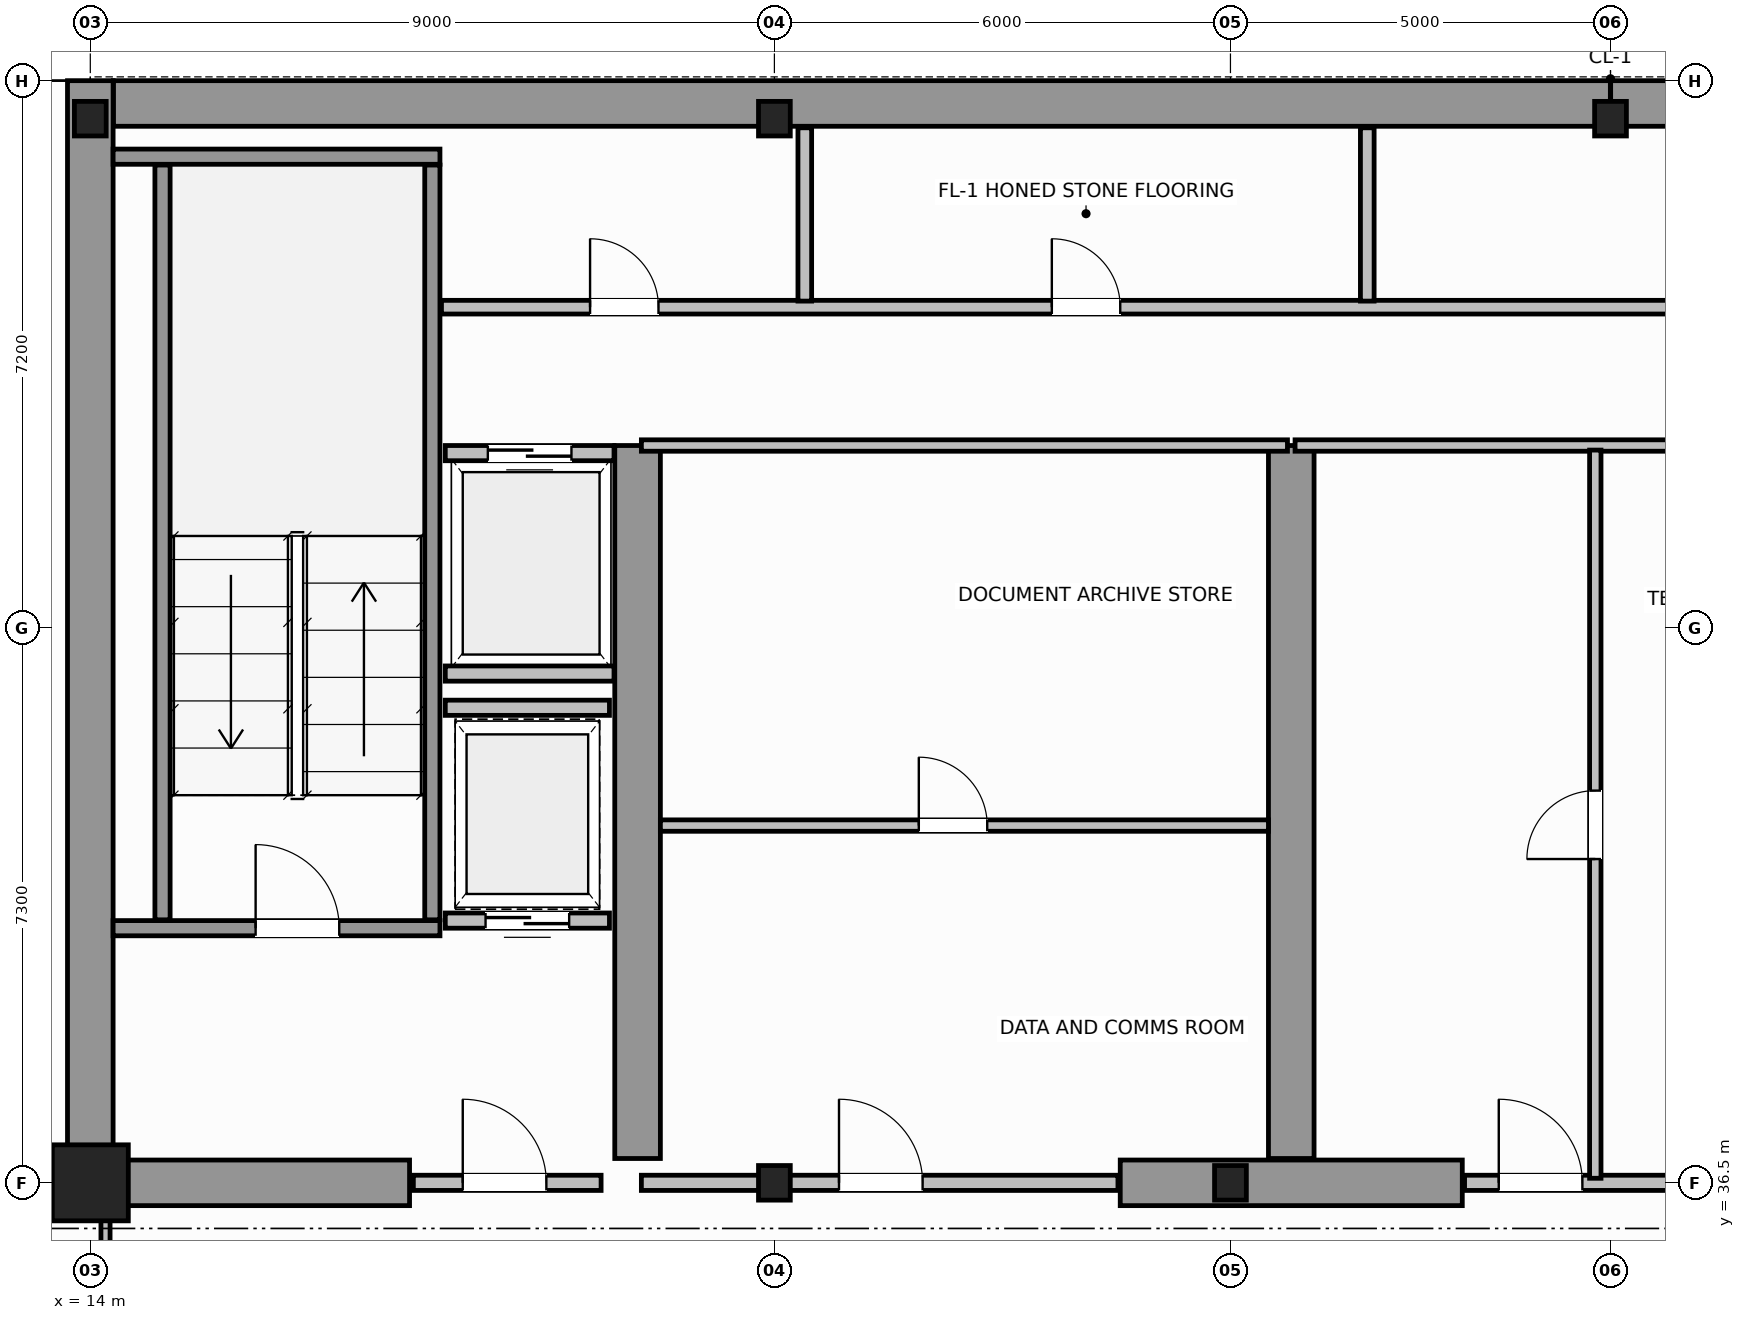
"""IFC4 building model, lengths in metres.
Left out: names, types, materials, properties, quantities, classifications, styles, units other than length and angle.
Written with IfcOpenShell. Run it as: python <this file> out.ifc"""

import sys

from ifc_helpers import new_model, si_unit, direction, frame, frame_2d, origin, origin_2d, place, context, subcontext, project, spatial, rectangle, i_section, extrude, source, transform, mapped, element, fill, save


model = new_model("IFC4")
c1 = context("Model", 3, precision=1e-05, world=origin(), true_north=direction((0.0, 1.0)))
c2 = subcontext(c1, "Body", "Model", "MODEL_VIEW")
j1 = project(units=[si_unit("LENGTHUNIT", "METRE"), si_unit("PLANEANGLEUNIT", "RADIAN")], contexts=[c1])
p1 = place(None, origin())
s1 = spatial("IfcSite", under=j1, at=p1, CompositionType="ELEMENT")
p2 = place(p1, origin())
s2 = spatial("IfcBuilding", under=s1, at=p2, CompositionType="ELEMENT")
p3 = place(p2, frame((0.0, 0.0, 223.2)))
s3 = spatial("IfcBuildingStorey", under=s2, at=p3, CompositionType="ELEMENT", Elevation=223.2)
m1 = source(origin(), c2, "Body", "SweptSolid", [
    extrude(rectangle(XDim=1.0, YDim=1.0, at=origin_2d()), origin(), (0.0, 0.0, 1.0), 3.8),
])
p4 = place(p3, frame((14.0, 36.5, 0.0), z_axis=(0.0, 0.0, 1.0), x_axis=(1.0, 0.0, 0.0)))
e1 = element("IfcColumn", 1, at=p4, inside=s3, PredefinedType="COLUMN", context=c2, shape_type="MappedRepresentation", body=[
    mapped(m1, transform((0.0, 0.0, 0.0), scale=1.0)),
])
m2 = source(origin(), c2, "Body", "SweptSolid", [
    extrude(i_section(OverallWidth=0.418, OverallDepth=0.455, WebThickness=0.042, FlangeThickness=0.058, FilletRadius=0.015, at=origin_2d()), origin(), (0.0, 0.0, 1.0), 3.8),
])
for number, where, z_axis, x_axis in (
    (2, (23.0, 36.5, 0.0), (0.0, 0.0, 1.0), (1.0, 0.0, 0.0)),
    (3, (29.0, 36.5, 0.0), (0.0, 0.0, 1.0), (1.0, 0.0, 0.0)),
    (4, (14.0, 50.5, 0.0), (0.0, 0.0, 1.0), (1.0, 0.0, 0.0)),
    (5, (23.0, 50.5, 0.0), (0.0, 0.0, 1.0), (1.0, 0.0, 0.0)),
    (6, (34.0, 50.5, 0.0), (0.0, 0.0, 1.0), (1.0, 0.0, 0.0)),
):
    element("IfcColumn", number, at=place(p3, frame(where, z_axis=z_axis, x_axis=x_axis)), inside=s3, PredefinedType="COLUMN", context=c2, shape_type="MappedRepresentation", body=[
        mapped(m2, transform((0.0, 0.0, 0.0), scale=1.0)),
    ])
for number, where, z_axis, x_axis in (
    (7, (14.304, 50.7, 0.0), (0.0, 0.0, 1.0), (1.0, 0.0, 0.0)),
    (8, (34.002, 50.7, 0.0), (0.0, 0.0, 1.0), (1.0, 0.0, 0.0)),
):
    element("IfcWall", number, at=place(p3, frame(where, z_axis=z_axis, x_axis=x_axis)), inside=s3, PredefinedType="SHEAR", context=c2, shape_type="SweptSolid", body=[
        extrude(rectangle(XDim=19.694, YDim=0.6, at=frame_2d((9.847, 0.0))), origin(), (0.0, 0.0, 1.0), 3.8),
    ])
p5 = place(p3, frame((14.0, 36.5, 0.0), z_axis=(0.0, 0.0, 1.0), x_axis=(0.0, 1.0, 0.0)))
e9 = element("IfcWall", 9, at=p5, inside=s3, PredefinedType="SHEAR", context=c2, shape_type="SweptSolid", body=[
    extrude(rectangle(XDim=14.5, YDim=0.6, at=frame_2d((7.25, 0.0))), origin(), (0.0, 0.0, 1.0), 3.8),
])
p6 = place(p3, frame((14.32, 36.5, 0.0), z_axis=(0.0, 0.0, 1.0), x_axis=(1.0, 0.0, 0.0)))
e10 = element("IfcWall", 10, at=p6, inside=s3, PredefinedType="SHEAR", context=c2, shape_type="SweptSolid", body=[
    extrude(rectangle(XDim=3.88, YDim=0.6, at=frame_2d((1.94, 0.0))), origin(), (0.0, 0.0, 1.0), 2.58),
])
p7 = place(p3, frame((27.55, 36.5, 0.0), z_axis=(0.0, 0.0, 1.0), x_axis=(1.0, 0.0, 0.0)))
e11 = element("IfcWall", 11, at=p7, inside=s3, PredefinedType="SHEAR", context=c2, shape_type="SweptSolid", body=[
    extrude(rectangle(XDim=4.5, YDim=0.6, at=frame_2d((2.25, 0.0))), origin(), (0.0, 0.0, 1.0), 3.8),
])
for number, where, z_axis, x_axis in (
    (12, (21.2, 36.82, 0.0), (0.0, 0.0, 1.0), (0.0, 1.0, 0.0)),
    (13, (29.8, 36.82, 0.0), (0.0, 0.0, 1.0), (0.0, 1.0, 0.0)),
):
    element("IfcWall", number, at=place(p3, frame(where, z_axis=z_axis, x_axis=x_axis)), inside=s3, PredefinedType="SHEAR", context=c2, shape_type="SweptSolid", body=[
        extrude(rectangle(XDim=9.38, YDim=0.6, at=frame_2d((4.69, 0.0))), origin(), (0.0, 0.0, 1.0), 3.8),
    ])
p8 = place(p3, frame((14.3, 39.85, 0.0), z_axis=(0.0, 0.0, 1.0), x_axis=(1.0, 0.0, 0.0)))
e14 = element("IfcWall", 14, at=p8, inside=s3, PredefinedType="SOLIDWALL", context=c2, shape_type="SweptSolid", body=[
    extrude(rectangle(XDim=4.3, YDim=0.2, at=frame_2d((2.15, 0.0))), origin(), (0.0, 0.0, 1.0), 3.8),
])
p9 = place(p8, frame((1.875, 0.0, 0.0)))
e15 = element("IfcOpeningElement", 15, at=p9, cuts=e14, PredefinedType="OPENING", context=c2, shape_type="SweptSolid", body=[
    extrude(rectangle(XDim=1.1, YDim=2.15, at=frame_2d((0.55, 1.075))), frame((0.0, 0.11, 0.0), z_axis=(0.0, -1.0, 0.0), x_axis=(1.0, 0.0, 0.0)), (0.0, 0.0, 1.0), 0.22),
])
p10 = place(p3, frame((14.3, 50.0, 0.0), z_axis=(0.0, 0.0, 1.0), x_axis=(1.0, 0.0, 0.0)))
e16 = element("IfcWall", 16, at=p10, inside=s3, PredefinedType="SOLIDWALL", context=c2, shape_type="SweptSolid", body=[
    extrude(rectangle(XDim=4.3, YDim=0.2, at=frame_2d((2.15, 0.0))), origin(), (0.0, 0.0, 1.0), 3.8),
])
for number, where, z_axis, x_axis in (
    (17, (14.95, 39.96, 0.0), (0.0, 0.0, 1.0), (0.0, 1.0, 0.0)),
    (18, (18.5, 39.96, 0.0), (0.0, 0.0, 1.0), (0.0, 1.0, 0.0)),
):
    element("IfcWall", number, at=place(p3, frame(where, z_axis=z_axis, x_axis=x_axis)), inside=s3, PredefinedType="SOLIDWALL", context=c2, shape_type="SweptSolid", body=[
        extrude(rectangle(XDim=9.93, YDim=0.2, at=frame_2d((4.965, 0.0))), origin(), (0.0, 0.0, 1.0), 3.8),
    ])
p11 = place(p3, frame((18.25, 36.5, 0.0), z_axis=(0.0, 0.0, 1.0), x_axis=(1.0, 0.0, 0.0)))
e19 = element("IfcWall", 19, at=p11, inside=s3, PredefinedType="SOLIDWALL", context=c2, shape_type="SweptSolid", body=[
    extrude(rectangle(XDim=2.47, YDim=0.2, at=frame_2d((1.235, 0.0))), origin(), (0.0, 0.0, 1.0), 2.57),
])
p12 = place(p11, frame((0.65, 0.0, 0.0)))
e20 = element("IfcOpeningElement", 20, at=p12, cuts=e19, PredefinedType="OPENING", context=c2, shape_type="SweptSolid", body=[
    extrude(rectangle(XDim=1.1, YDim=2.15, at=frame_2d((0.55, 1.075))), frame((0.0, 0.11, 0.0), z_axis=(0.0, -1.0, 0.0), x_axis=(1.0, 0.0, 0.0)), (0.0, 0.0, 1.0), 0.22),
])
p13 = place(p3, frame((18.67, 46.1, 0.0), z_axis=(0.0, 0.0, 1.0), x_axis=(1.0, 0.0, 0.0)))
e21 = element("IfcWall", 21, at=p13, inside=s3, PredefinedType="SOLIDWALL", context=c2, shape_type="SweptSolid", body=[
    extrude(rectangle(XDim=2.22, YDim=0.2, at=frame_2d((1.11, 0.0))), origin(), (0.0, 0.0, 1.0), 3.58),
])
p14 = place(p13, frame((0.56, 0.0, 0.0)))
e22 = element("IfcOpeningElement", 22, at=p14, cuts=e21, PredefinedType="OPENING", context=c2, shape_type="SweptSolid", body=[
    extrude(rectangle(XDim=1.1, YDim=2.15, at=frame_2d((0.55, 1.075))), frame((0.0, 0.11, 0.0), z_axis=(0.0, -1.0, 0.0), x_axis=(1.0, 0.0, 0.0)), (0.0, 0.0, 1.0), 0.22),
])
p15 = place(p3, frame((18.67, 43.2, 0.0), z_axis=(0.0, 0.0, 1.0), x_axis=(1.0, 0.0, 0.0)))
e23 = element("IfcWall", 23, at=p15, inside=s3, PredefinedType="SOLIDWALL", context=c2, shape_type="SweptSolid", body=[
    extrude(rectangle(XDim=2.22, YDim=0.2, at=frame_2d((1.11, 0.0))), origin(), (0.0, 0.0, 1.0), 3.58),
])
p16 = place(p3, frame((18.67, 39.95, 0.0), z_axis=(0.0, 0.0, 1.0), x_axis=(1.0, 0.0, 0.0)))
e24 = element("IfcWall", 24, at=p16, inside=s3, PredefinedType="SOLIDWALL", context=c2, shape_type="SweptSolid", body=[
    extrude(rectangle(XDim=2.16, YDim=0.2, at=frame_2d((1.08, 0.0))), origin(), (0.0, 0.0, 1.0), 3.58),
])
p17 = place(p16, frame((0.53, 0.0, 0.0)))
e25 = element("IfcOpeningElement", 25, at=p17, cuts=e24, PredefinedType="OPENING", context=c2, shape_type="SweptSolid", body=[
    extrude(rectangle(XDim=1.1, YDim=2.15, at=frame_2d((0.55, 1.075))), frame((0.0, 0.11, 0.0), z_axis=(0.0, -1.0, 0.0), x_axis=(1.0, 0.0, 0.0)), (0.0, 0.0, 1.0), 0.22),
])
p18 = place(p3, frame((18.67, 42.75, 0.0), z_axis=(0.0, 0.0, 1.0), x_axis=(1.0, 0.0, 0.0)))
e26 = element("IfcWall", 26, at=p18, inside=s3, PredefinedType="SOLIDWALL", context=c2, shape_type="SweptSolid", body=[
    extrude(rectangle(XDim=2.16, YDim=0.2, at=frame_2d((1.08, 0.0))), origin(), (0.0, 0.0, 1.0), 3.58),
])
p19 = place(p3, frame((21.25, 36.5, 0.0), z_axis=(0.0, 0.0, 1.0), x_axis=(1.0, 0.0, 0.0)))
e27 = element("IfcWall", 27, at=p19, inside=s3, PredefinedType="SOLIDWALL", context=c2, shape_type="SweptSolid", body=[
    extrude(rectangle(XDim=6.27, YDim=0.2, at=frame_2d((3.135, 0.0))), origin(), (0.0, 0.0, 1.0), 2.57),
])
p20 = place(p19, frame((2.6, 0.0, 0.0)))
e28 = element("IfcOpeningElement", 28, at=p20, cuts=e27, PredefinedType="OPENING", context=c2, shape_type="SweptSolid", body=[
    extrude(rectangle(XDim=1.1, YDim=2.15, at=frame_2d((0.55, 1.075))), frame((0.0, 0.11, 0.0), z_axis=(0.0, -1.0, 0.0), x_axis=(1.0, 0.0, 0.0)), (0.0, 0.0, 1.0), 0.22),
])
p21 = place(p3, frame((21.25, 46.2, 0.0), z_axis=(0.0, 0.0, 1.0), x_axis=(1.0, 0.0, 0.0)))
e29 = element("IfcWall", 29, at=p21, inside=s3, PredefinedType="PARTITIONING", context=c2, shape_type="SweptSolid", body=[
    extrude(rectangle(XDim=8.5, YDim=0.15, at=frame_2d((4.25, 0.0))), origin(), (0.0, 0.0, 1.0), 3.58),
])
p22 = place(p3, frame((21.5, 41.2, 0.0), z_axis=(0.0, 0.0, 1.0), x_axis=(1.0, 0.0, 0.0)))
e30 = element("IfcWall", 30, at=p22, inside=s3, PredefinedType="PARTITIONING", context=c2, shape_type="SweptSolid", body=[
    extrude(rectangle(XDim=8.0, YDim=0.15, at=frame_2d((4.0, 0.0))), origin(), (0.0, 0.0, 1.0), 3.58),
])
p23 = place(p22, frame((3.4, 0.0, 0.0)))
e31 = element("IfcOpeningElement", 31, at=p23, cuts=e30, PredefinedType="OPENING", context=c2, shape_type="SweptSolid", body=[
    extrude(rectangle(XDim=0.9, YDim=2.1, at=frame_2d((0.45, 1.05))), frame((0.0, 0.085, 0.0), z_axis=(0.0, -1.0, 0.0), x_axis=(1.0, 0.0, 0.0)), (0.0, 0.0, 1.0), 0.17),
])
p24 = place(p3, frame((32.08, 36.5, 0.0), z_axis=(0.0, 0.0, 1.0), x_axis=(1.0, 0.0, 0.0)))
e32 = element("IfcWall", 32, at=p24, inside=s3, PredefinedType="SOLIDWALL", context=c2, shape_type="SweptSolid", body=[
    extrude(rectangle(XDim=4.04, YDim=0.2, at=frame_2d((2.02, 0.0))), origin(), (0.0, 0.0, 1.0), 2.97),
])
p25 = place(p24, frame((0.45, 0.0, 0.0)))
e33 = element("IfcOpeningElement", 33, at=p25, cuts=e32, PredefinedType="OPENING", context=c2, shape_type="SweptSolid", body=[
    extrude(rectangle(XDim=1.1, YDim=2.15, at=frame_2d((0.55, 1.075))), frame((0.0, 0.11, 0.0), z_axis=(0.0, -1.0, 0.0), x_axis=(1.0, 0.0, 0.0)), (0.0, 0.0, 1.0), 0.22),
])
p26 = place(p3, frame((29.85, 46.2, 0.0), z_axis=(0.0, 0.0, 1.0), x_axis=(1.0, 0.0, 0.0)))
e34 = element("IfcWall", 34, at=p26, inside=s3, PredefinedType="PARTITIONING", context=c2, shape_type="SweptSolid", body=[
    extrude(rectangle(XDim=8.5, YDim=0.15, at=frame_2d((4.25, 0.0))), origin(), (0.0, 0.0, 1.0), 3.58),
])
p27 = place(p3, frame((33.8, 36.56, 0.0), z_axis=(0.0, 0.0, 1.0), x_axis=(0.0, 1.0, 0.0)))
e35 = element("IfcWall", 35, at=p27, inside=s3, PredefinedType="PARTITIONING", context=c2, shape_type="SweptSolid", body=[
    extrude(rectangle(XDim=9.58, YDim=0.15, at=frame_2d((4.79, 0.0))), origin(), (0.0, 0.0, 1.0), 3.58),
])
p28 = place(p27, frame((4.2, 0.0, 0.0)))
e36 = element("IfcOpeningElement", 36, at=p28, cuts=e35, PredefinedType="OPENING", context=c2, shape_type="SweptSolid", body=[
    extrude(rectangle(XDim=0.9, YDim=2.1, at=frame_2d((0.45, 1.05))), frame((0.0, 0.085, 0.0), z_axis=(0.0, -1.0, 0.0), x_axis=(1.0, 0.0, 0.0)), (0.0, 0.0, 1.0), 0.17),
])
p29 = place(p3, frame((18.62, 48.02, 0.0), z_axis=(0.0, 0.0, 1.0), x_axis=(1.0, 0.0, 0.0)))
e37 = element("IfcWall", 37, at=p29, inside=s3, PredefinedType="PLUMBINGWALL", context=c2, shape_type="SweptSolid", body=[
    extrude(rectangle(XDim=30.76, YDim=0.18, at=frame_2d((15.38, 0.0))), origin(), (0.0, 0.0, 1.0), 3.58),
])
p30 = place(p29, frame((1.955, 0.0, 0.0)))
e38 = element("IfcOpeningElement", 38, at=p30, cuts=e37, PredefinedType="OPENING", context=c2, shape_type="SweptSolid", body=[
    extrude(rectangle(XDim=0.9, YDim=2.15, at=frame_2d((0.45, 1.075))), frame((0.0, 0.1, 0.0), z_axis=(0.0, -1.0, 0.0), x_axis=(1.0, 0.0, 0.0)), (0.0, 0.0, 1.0), 0.2),
])
p31 = place(p29, frame((8.03, 0.0, 0.0)))
e39 = element("IfcOpeningElement", 39, at=p31, cuts=e37, PredefinedType="OPENING", context=c2, shape_type="SweptSolid", body=[
    extrude(rectangle(XDim=0.9, YDim=2.15, at=frame_2d((0.45, 1.075))), frame((0.0, 0.1, 0.0), z_axis=(0.0, -1.0, 0.0), x_axis=(1.0, 0.0, 0.0)), (0.0, 0.0, 1.0), 0.2),
])
p32 = place(p29, frame((16.93, 0.0, 0.0)))
e40 = element("IfcOpeningElement", 40, at=p32, cuts=e37, PredefinedType="OPENING", context=c2, shape_type="SweptSolid", body=[
    extrude(rectangle(XDim=0.9, YDim=2.15, at=frame_2d((0.45, 1.075))), frame((0.0, 0.1, 0.0), z_axis=(0.0, -1.0, 0.0), x_axis=(1.0, 0.0, 0.0)), (0.0, 0.0, 1.0), 0.2),
])
p33 = place(p29, frame((26.205, 0.0, 0.0)))
e41 = element("IfcOpeningElement", 41, at=p33, cuts=e37, PredefinedType="OPENING", context=c2, shape_type="SweptSolid", body=[
    extrude(rectangle(XDim=0.9, YDim=2.15, at=frame_2d((0.45, 1.075))), frame((0.0, 0.1, 0.0), z_axis=(0.0, -1.0, 0.0), x_axis=(1.0, 0.0, 0.0)), (0.0, 0.0, 1.0), 0.2),
])
for number, where, z_axis, x_axis in (
    (42, (23.4, 48.1, 0.0), (0.0, 0.0, 1.0), (0.0, 1.0, 0.0)),
    (43, (30.8, 48.1, 0.0), (0.0, 0.0, 1.0), (0.0, 1.0, 0.0)),
):
    element("IfcWall", number, at=place(p3, frame(where, z_axis=z_axis, x_axis=x_axis)), inside=s3, PredefinedType="PLUMBINGWALL", context=c2, shape_type="SweptSolid", body=[
        extrude(rectangle(XDim=2.28, YDim=0.18, at=frame_2d((1.14, 0.0))), origin(), (0.0, 0.0, 1.0), 3.58),
    ])
p34 = place(p3, frame((14.2, 34.0, 0.0), z_axis=(0.0, 0.0, 1.0), x_axis=(0.0, 1.0, 0.0)))
e44 = element("IfcWall", 44, at=p34, inside=s3, PredefinedType="PARTITIONING", context=c2, shape_type="SweptSolid", body=[
    extrude(rectangle(XDim=2.44, YDim=0.12, at=frame_2d((1.22, 0.0))), origin(), (0.0, 0.0, 1.0), 3.58),
])
p35 = place(p34, frame((0.7, 0.0, 0.0)))
e45 = element("IfcOpeningElement", 45, at=p35, cuts=e44, PredefinedType="OPENING", context=c2, shape_type="SweptSolid", body=[
    extrude(rectangle(XDim=0.9, YDim=2.15, at=frame_2d((0.45, 1.075))), frame((0.0, 0.07, 0.0), z_axis=(0.0, -1.0, 0.0), x_axis=(1.0, 0.0, 0.0)), (0.0, 0.0, 1.0), 0.14),
])
m3 = source(origin(), c2, "Body", "SweptSolid", [
    extrude(rectangle(XDim=1.1, YDim=2.15, at=frame_2d((0.55, 1.075))), frame((0.0, 0.025, 0.0), z_axis=(0.0, -1.0, 0.0), x_axis=(1.0, 0.0, 0.0)), (0.0, 0.0, 1.0), 0.05),
])
p36 = place(p9, origin())
e46 = element("IfcDoor", 46, at=p36, inside=s3, OperationType="SINGLE_SWING_LEFT", PredefinedType="DOOR", context=c2, shape_type="MappedRepresentation", body=[
    mapped(m3, transform((0.0, 0.0, 0.0), scale=1.0)),
])
fill(e15, e46)
p37 = place(p12, origin())
e47 = element("IfcDoor", 47, at=p37, inside=s3, OperationType="SINGLE_SWING_RIGHT", PredefinedType="DOOR", context=c2, shape_type="MappedRepresentation", body=[
    mapped(m3, transform((0.0, 0.0, 0.0), scale=1.0)),
])
fill(e20, e47)
p38 = place(p14, origin())
e48 = element("IfcDoor", 48, at=p38, inside=s3, OperationType="DOUBLE_DOOR_SLIDING", PredefinedType="DOOR", context=c2, shape_type="MappedRepresentation", body=[
    mapped(m3, transform((0.0, 0.0, 0.0), scale=1.0)),
])
fill(e22, e48)
p39 = place(p17, origin())
e49 = element("IfcDoor", 49, at=p39, inside=s3, OperationType="DOUBLE_DOOR_SLIDING", PredefinedType="DOOR", context=c2, shape_type="MappedRepresentation", body=[
    mapped(m3, transform((0.0, 0.0, 0.0), scale=1.0)),
])
fill(e25, e49)
p40 = place(p20, origin())
e50 = element("IfcDoor", 50, at=p40, inside=s3, OperationType="SINGLE_SWING_LEFT", PredefinedType="DOOR", context=c2, shape_type="MappedRepresentation", body=[
    mapped(m3, transform((0.0, 0.0, 0.0), scale=1.0)),
])
fill(e28, e50)
m4 = source(origin(), c2, "Body", "SweptSolid", [
    extrude(rectangle(XDim=0.9, YDim=2.1, at=frame_2d((0.45, 1.05))), frame((0.0, 0.025, 0.0), z_axis=(0.0, -1.0, 0.0), x_axis=(1.0, 0.0, 0.0)), (0.0, 0.0, 1.0), 0.05),
])
p41 = place(p23, origin())
e51 = element("IfcDoor", 51, at=p41, inside=s3, OperationType="SINGLE_SWING_RIGHT", PredefinedType="DOOR", context=c2, shape_type="MappedRepresentation", body=[
    mapped(m4, transform((0.0, 0.0, 0.0), scale=1.0)),
])
fill(e31, e51)
p42 = place(p25, origin())
e52 = element("IfcDoor", 52, at=p42, inside=s3, OperationType="SINGLE_SWING_LEFT", PredefinedType="DOOR", context=c2, shape_type="MappedRepresentation", body=[
    mapped(m3, transform((0.0, 0.0, 0.0), scale=1.0)),
])
fill(e33, e52)
p43 = place(p28, origin())
e53 = element("IfcDoor", 53, at=p43, inside=s3, OperationType="SINGLE_SWING_RIGHT", PredefinedType="DOOR", context=c2, shape_type="MappedRepresentation", body=[
    mapped(m4, transform((0.0, 0.0, 0.0), scale=1.0)),
])
fill(e36, e53)
m5 = source(origin(), c2, "Body", "SweptSolid", [
    extrude(rectangle(XDim=0.9, YDim=2.15, at=frame_2d((0.45, 1.075))), frame((0.0, 0.025, 0.0), z_axis=(0.0, -1.0, 0.0), x_axis=(1.0, 0.0, 0.0)), (0.0, 0.0, 1.0), 0.05),
])
p44 = place(p30, origin())
e54 = element("IfcDoor", 54, at=p44, inside=s3, OperationType="SINGLE_SWING_LEFT", PredefinedType="DOOR", context=c2, shape_type="MappedRepresentation", body=[
    mapped(m5, transform((0.0, 0.0, 0.0), scale=1.0)),
])
fill(e38, e54)
p45 = place(p31, origin())
e55 = element("IfcDoor", 55, at=p45, inside=s3, OperationType="SINGLE_SWING_RIGHT", PredefinedType="DOOR", context=c2, shape_type="MappedRepresentation", body=[
    mapped(m5, transform((0.0, 0.0, 0.0), scale=1.0)),
])
fill(e39, e55)
save(model, sys.argv[1])
